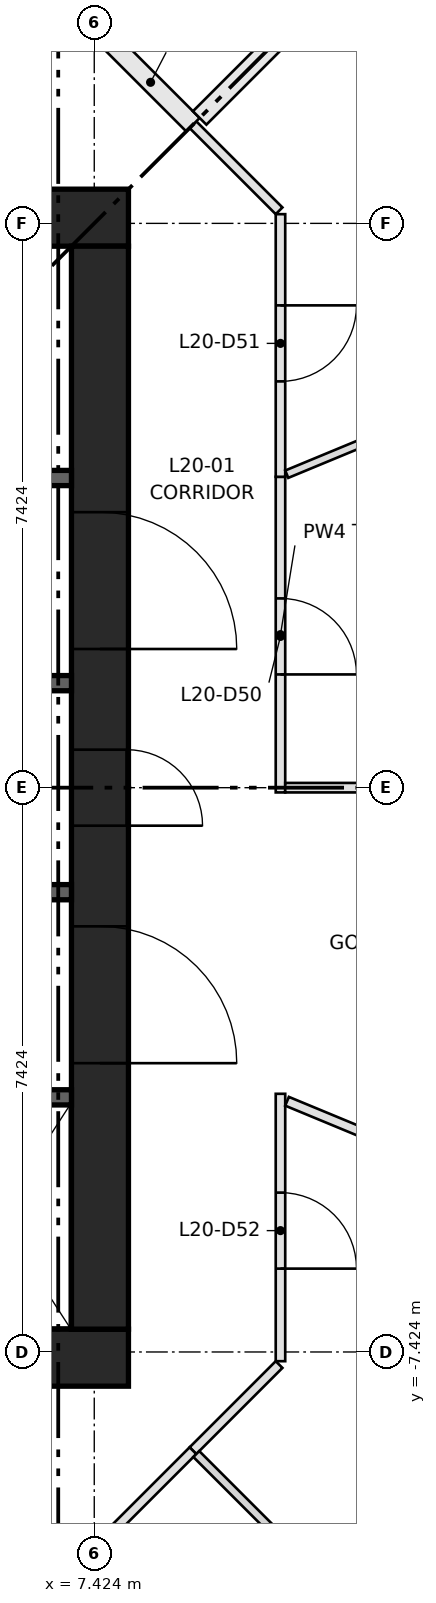
"""IFC4 building model, lengths in metres.
Left out: names, types, materials, properties, quantities, classifications, styles, units other than length and angle.
Written with IfcOpenShell. Run it as: python <this file> out.ifc"""

import sys

from ifc_helpers import new_model, si_unit, direction, frame, frame_2d, origin, place, context, subcontext, project, spatial, rectangle, extrude, element, fill, save


model = new_model("IFC4")
c1 = context("Model", 3, precision=1e-05, world=origin(), true_north=direction((0.0, 1.0)))
c2 = subcontext(c1, "Body", "Model", "MODEL_VIEW")
j1 = project(units=[si_unit("LENGTHUNIT", "METRE"), si_unit("PLANEANGLEUNIT", "RADIAN")], contexts=[c1])
p1 = place(None, origin())
s1 = spatial("IfcSite", under=j1, at=p1, CompositionType="ELEMENT")
p2 = place(p1, origin())
s2 = spatial("IfcBuilding", under=s1, at=p2, CompositionType="ELEMENT")
p3 = place(p2, frame((0.0, 0.0, 80.05)))
s3 = spatial("IfcBuildingStorey", under=s2, at=p3, CompositionType="ELEMENT", Elevation=80.05)
for number, where, z_axis, x_axis in (
    (1, (-7.874, -7.499, 0.0), (0.0, 0.0, 1.0), (1.0, 0.0, 0.0)),
    (2, (-7.874, 7.499, 0.0), (0.0, 0.0, 1.0), (1.0, 0.0, 0.0)),
):
    element("IfcWall", number, at=place(p3, frame(where, z_axis=z_axis, x_axis=x_axis)), inside=s3, PredefinedType="SHEAR", context=c2, shape_type="SweptSolid", body=[
        extrude(rectangle(XDim=15.748, YDim=0.75, at=frame_2d((7.874, 0.0))), origin(), (0.0, 0.0, 1.0), 3.65),
    ])
p4 = place(p3, frame((7.499, -7.124, 0.0), z_axis=(0.0, 0.0, 1.0), x_axis=(0.0, 1.0, 0.0)))
e3 = element("IfcWall", 3, at=p4, inside=s3, PredefinedType="SHEAR", context=c2, shape_type="SweptSolid", body=[
    extrude(rectangle(XDim=14.248, YDim=0.75, at=frame_2d((7.124, 0.0))), origin(), (0.0, 0.0, 1.0), 3.65),
])
p5 = place(p4, frame((6.624, 0.0, 0.0)))
e4 = element("IfcOpeningElement", 4, at=p5, cuts=e3, PredefinedType="OPENING", context=c2, shape_type="SweptSolid", body=[
    extrude(rectangle(XDim=1.0, YDim=2.1, at=frame_2d((0.5, 1.05))), frame((0.0, 0.385, 0.0), z_axis=(0.0, -1.0, 0.0), x_axis=(1.0, 0.0, 0.0)), (0.0, 0.0, 1.0), 0.77),
])
p6 = place(p4, frame((3.5, 0.0, 0.0)))
e5 = element("IfcOpeningElement", 5, at=p6, cuts=e3, PredefinedType="OPENING", context=c2, shape_type="SweptSolid", body=[
    extrude(rectangle(XDim=1.8, YDim=2.1, at=frame_2d((0.9, 1.05))), frame((0.0, 0.385, 0.0), z_axis=(0.0, -1.0, 0.0), x_axis=(1.0, 0.0, 0.0)), (0.0, 0.0, 1.0), 0.77),
])
p7 = place(p4, frame((8.948, 0.0, 0.0)))
e6 = element("IfcOpeningElement", 6, at=p7, cuts=e3, PredefinedType="OPENING", context=c2, shape_type="SweptSolid", body=[
    extrude(rectangle(XDim=1.8, YDim=2.1, at=frame_2d((0.9, 1.05))), frame((0.0, 0.385, 0.0), z_axis=(0.0, -1.0, 0.0), x_axis=(1.0, 0.0, 0.0)), (0.0, 0.0, 1.0), 0.77),
])
p8 = place(p3, frame((-7.124, -4.074, 0.0), z_axis=(0.0, 0.0, 1.0), x_axis=(1.0, 0.0, 0.0)))
e7 = element("IfcWall", 7, at=p8, inside=s3, PredefinedType="SHEAR", context=c2, shape_type="SweptSolid", body=[
    extrude(rectangle(XDim=14.248, YDim=0.2, at=frame_2d((7.124, 0.0))), origin(), (0.0, 0.0, 1.0), 3.3),
])
p9 = place(p8, frame((1.069, 0.0, 0.0)))
e8 = element("IfcOpeningElement", 8, at=p9, cuts=e7, PredefinedType="OPENING", context=c2, shape_type="SweptSolid", body=[
    extrude(rectangle(XDim=1.1, YDim=2.1, at=frame_2d((0.55, 1.05))), frame((0.0, 0.11, 0.0), z_axis=(0.0, -1.0, 0.0), x_axis=(1.0, 0.0, 0.0)), (0.0, 0.0, 1.0), 0.22),
])
p10 = place(p8, frame((4.206, 0.0, 0.0)))
e9 = element("IfcOpeningElement", 9, at=p10, cuts=e7, PredefinedType="OPENING", context=c2, shape_type="SweptSolid", body=[
    extrude(rectangle(XDim=1.1, YDim=2.1, at=frame_2d((0.55, 1.05))), frame((0.0, 0.11, 0.0), z_axis=(0.0, -1.0, 0.0), x_axis=(1.0, 0.0, 0.0)), (0.0, 0.0, 1.0), 0.22),
])
p11 = place(p8, frame((6.808, 0.0, 0.0)))
e10 = element("IfcOpeningElement", 10, at=p11, cuts=e7, PredefinedType="OPENING", context=c2, shape_type="SweptSolid", body=[
    extrude(rectangle(XDim=1.0, YDim=2.1, at=frame_2d((0.5, 1.05))), frame((0.0, 0.11, 0.0), z_axis=(0.0, -1.0, 0.0), x_axis=(1.0, 0.0, 0.0)), (0.0, 0.0, 1.0), 0.22),
])
p12 = place(p8, frame((8.777, 0.0, 0.0)))
e11 = element("IfcOpeningElement", 11, at=p12, cuts=e7, PredefinedType="OPENING", context=c2, shape_type="SweptSolid", body=[
    extrude(rectangle(XDim=1.0, YDim=2.1, at=frame_2d((0.5, 1.05))), frame((0.0, 0.11, 0.0), z_axis=(0.0, -1.0, 0.0), x_axis=(1.0, 0.0, 0.0)), (0.0, 0.0, 1.0), 0.22),
])
p13 = place(p8, frame((10.745, 0.0, 0.0)))
e12 = element("IfcOpeningElement", 12, at=p13, cuts=e7, PredefinedType="OPENING", context=c2, shape_type="SweptSolid", body=[
    extrude(rectangle(XDim=1.0, YDim=2.1, at=frame_2d((0.5, 1.05))), frame((0.0, 0.11, 0.0), z_axis=(0.0, -1.0, 0.0), x_axis=(1.0, 0.0, 0.0)), (0.0, 0.0, 1.0), 0.22),
])
p14 = place(p8, frame((12.714, 0.0, 0.0)))
e13 = element("IfcOpeningElement", 13, at=p14, cuts=e7, PredefinedType="OPENING", context=c2, shape_type="SweptSolid", body=[
    extrude(rectangle(XDim=1.0, YDim=2.1, at=frame_2d((0.5, 1.05))), frame((0.0, 0.11, 0.0), z_axis=(0.0, -1.0, 0.0), x_axis=(1.0, 0.0, 0.0)), (0.0, 0.0, 1.0), 0.22),
])
p15 = place(p3, frame((0.0, 4.074, 0.0), z_axis=(0.0, 0.0, 1.0), x_axis=(1.0, 0.0, 0.0)))
e14 = element("IfcWall", 14, at=p15, inside=s3, PredefinedType="SHEAR", context=c2, shape_type="SweptSolid", body=[
    extrude(rectangle(XDim=7.124, YDim=0.2, at=frame_2d((3.562, 0.0))), origin(), (0.0, 0.0, 1.0), 3.3),
])
p16 = place(p15, frame((0.753, 0.0, 0.0)))
e15 = element("IfcOpeningElement", 15, at=p16, cuts=e14, PredefinedType="OPENING", context=c2, shape_type="SweptSolid", body=[
    extrude(rectangle(XDim=1.0, YDim=2.1, at=frame_2d((0.5, 1.05))), frame((0.0, 0.11, 0.0), z_axis=(0.0, -1.0, 0.0), x_axis=(1.0, 0.0, 0.0)), (0.0, 0.0, 1.0), 0.22),
])
p17 = place(p15, frame((2.685, 0.0, 0.0)))
e16 = element("IfcOpeningElement", 16, at=p17, cuts=e14, PredefinedType="OPENING", context=c2, shape_type="SweptSolid", body=[
    extrude(rectangle(XDim=0.95, YDim=2.1, at=frame_2d((0.475, 1.05))), frame((0.0, 0.11, 0.0), z_axis=(0.0, -1.0, 0.0), x_axis=(1.0, 0.0, 0.0)), (0.0, 0.0, 1.0), 0.22),
])
p18 = place(p15, frame((4.06, 0.0, 0.0)))
e17 = element("IfcOpeningElement", 17, at=p18, cuts=e14, PredefinedType="OPENING", context=c2, shape_type="SweptSolid", body=[
    extrude(rectangle(XDim=1.0, YDim=2.1, at=frame_2d((0.5, 1.05))), frame((0.0, 0.11, 0.0), z_axis=(0.0, -1.0, 0.0), x_axis=(1.0, 0.0, 0.0)), (0.0, 0.0, 1.0), 0.22),
])
p19 = place(p15, frame((5.79, 0.0, 0.0)))
e18 = element("IfcOpeningElement", 18, at=p19, cuts=e14, PredefinedType="OPENING", context=c2, shape_type="SweptSolid", body=[
    extrude(rectangle(XDim=0.8, YDim=2.1, at=frame_2d((0.4, 1.05))), frame((0.0, 0.11, 0.0), z_axis=(0.0, -1.0, 0.0), x_axis=(1.0, 0.0, 0.0)), (0.0, 0.0, 1.0), 0.22),
])
for number, where, z_axis, x_axis in (
    (19, (4.374, -1.375, 0.0), (0.0, 0.0, 1.0), (1.0, 0.0, 0.0)),
    (20, (4.374, 1.375, 0.0), (0.0, 0.0, 1.0), (1.0, 0.0, 0.0)),
):
    element("IfcWall", number, at=place(p3, frame(where, z_axis=z_axis, x_axis=x_axis)), inside=s3, PredefinedType="SHEAR", context=c2, shape_type="SweptSolid", body=[
        extrude(rectangle(XDim=2.75, YDim=0.2, at=frame_2d((1.375, 0.0))), origin(), (0.0, 0.0, 1.0), 3.3),
    ])
p20 = place(p3, frame((9.874, 4.09, 0.0), z_axis=(0.0, 0.0, 1.0), x_axis=(0.0, -1.0, 0.0)))
e21 = element("IfcWall", 21, at=p20, inside=s3, PredefinedType="PARTITIONING", context=c2, shape_type="SweptSolid", body=[
    extrude(rectangle(XDim=4.152, YDim=0.125, at=frame_2d((2.076, 0.0))), origin(), (0.0, 0.0, 1.0), 3.3),
])
p21 = place(p20, frame((1.6, 0.0, 0.0)))
e22 = element("IfcOpeningElement", 22, at=p21, cuts=e21, PredefinedType="OPENING", context=c2, shape_type="SweptSolid", body=[
    extrude(rectangle(XDim=1.0, YDim=2.1, at=frame_2d((0.5, 1.05))), frame((0.0, 0.073, 0.0), z_axis=(0.0, -1.0, 0.0), x_axis=(1.0, 0.0, 0.0)), (0.0, 0.0, 1.0), 0.145),
])
p22 = place(p3, frame((8.722, 8.722, 0.0), z_axis=(0.0, 0.0, 1.0), x_axis=(0.70718294931, -0.707030604857, 0.0)))
e23 = element("IfcWall", 23, at=p22, inside=s3, PredefinedType="PARTITIONING", context=c2, shape_type="SweptSolid", body=[
    extrude(rectangle(XDim=1.603, YDim=0.125, at=frame_2d((0.801, 0.0))), origin(), (0.0, 0.0, 1.0), 3.3),
])
p23 = place(p3, frame((9.874, 7.545, 0.0), z_axis=(0.0, 0.0, 1.0), x_axis=(0.0, -1.0, 0.0)))
e24 = element("IfcWall", 24, at=p23, inside=s3, PredefinedType="PARTITIONING", context=c2, shape_type="SweptSolid", body=[
    extrude(rectangle(XDim=3.455, YDim=0.125, at=frame_2d((1.728, 0.0))), origin(), (0.0, 0.0, 1.0), 3.3),
])
p24 = place(p23, frame((1.2, 0.0, 0.0)))
e25 = element("IfcOpeningElement", 25, at=p24, cuts=e24, PredefinedType="OPENING", context=c2, shape_type="SweptSolid", body=[
    extrude(rectangle(XDim=1.0, YDim=2.1, at=frame_2d((0.5, 1.05))), frame((0.0, 0.073, 0.0), z_axis=(0.0, -1.0, 0.0), x_axis=(1.0, 0.0, 0.0)), (0.0, 0.0, 1.0), 0.145),
])
p25 = place(p3, frame((9.856, -7.589, 0.0), z_axis=(0.0, 0.0, 1.0), x_axis=(-0.70718294931, -0.707030604857, 0.0)))
e26 = element("IfcWall", 26, at=p25, inside=s3, PredefinedType="PARTITIONING", context=c2, shape_type="SweptSolid", body=[
    extrude(rectangle(XDim=1.603, YDim=0.125, at=frame_2d((0.801, 0.0))), origin(), (0.0, 0.0, 1.0), 3.3),
])
p26 = place(p3, frame((9.874, -4.027, 0.0), z_axis=(0.0, 0.0, 1.0), x_axis=(0.0, -1.0, 0.0)))
e27 = element("IfcWall", 27, at=p26, inside=s3, PredefinedType="PARTITIONING", context=c2, shape_type="SweptSolid", body=[
    extrude(rectangle(XDim=3.518, YDim=0.125, at=frame_2d((1.759, 0.0))), origin(), (0.0, 0.0, 1.0), 3.3),
])
p27 = place(p26, frame((1.3, 0.0, 0.0)))
e28 = element("IfcOpeningElement", 28, at=p27, cuts=e27, PredefinedType="OPENING", context=c2, shape_type="SweptSolid", body=[
    extrude(rectangle(XDim=1.0, YDim=2.1, at=frame_2d((0.5, 1.05))), frame((0.0, 0.073, 0.0), z_axis=(0.0, -1.0, 0.0), x_axis=(1.0, 0.0, 0.0)), (0.0, 0.0, 1.0), 0.145),
])
p28 = place(p3, frame((7.608, 9.837, 0.0), z_axis=(0.0, 0.0, 1.0), x_axis=(0.707029353672, -0.707184200224, 0.0)))
e29 = element("IfcWall", 29, at=p28, inside=s3, PredefinedType="PARTITIONING", context=c2, shape_type="SweptSolid", body=[
    extrude(rectangle(XDim=1.577, YDim=0.25, at=frame_2d((0.788, 0.0))), origin(), (0.0, 0.0, 1.0), 3.3),
])
p29 = place(p3, frame((8.722, -8.722, 0.0), z_axis=(0.0, 0.0, 1.0), x_axis=(-0.707030604857, -0.70718294931, 0.0)))
e30 = element("IfcWall", 30, at=p29, inside=s3, PredefinedType="PARTITIONING", context=c2, shape_type="SweptSolid", body=[
    extrude(rectangle(XDim=1.603, YDim=0.125, at=frame_2d((0.801, 0.0))), origin(), (0.0, 0.0, 1.0), 3.3),
])
p30 = place(p3, frame((9.957, 4.124, 0.0), z_axis=(0.0, 0.0, 1.0), x_axis=(0.923858155589, 0.382735036745, 0.0)))
e31 = element("IfcWall", 31, at=p30, inside=s3, PredefinedType="PARTITIONING", context=c2, shape_type="SweptSolid", body=[
    extrude(rectangle(XDim=2.813, YDim=0.105, at=frame_2d((1.406, 0.0))), origin(), (0.0, 0.0, 1.0), 3.3),
])
p31 = place(p3, frame((13.59, 0.0, 0.0), z_axis=(0.0, 0.0, 1.0), x_axis=(-1.0, 0.0, 0.0)))
e32 = element("IfcWall", 32, at=p31, inside=s3, PredefinedType="PARTITIONING", context=c2, shape_type="SweptSolid", body=[
    extrude(rectangle(XDim=3.654, YDim=0.125, at=frame_2d((1.827, 0.0))), origin(), (0.0, 0.0, 1.0), 3.3),
])
p32 = place(p3, frame((12.912, 12.912, 0.0), z_axis=(0.0, 0.0, 1.0), x_axis=(-0.707106781187, -0.707106781187, 0.0)))
e33 = element("IfcWall", 33, at=p32, inside=s3, PredefinedType="PARTITIONING", context=c2, shape_type="SweptSolid", body=[
    extrude(rectangle(XDim=5.8, YDim=0.25, at=frame_2d((2.9, 0.0))), origin(), (0.0, 0.0, 1.0), 3.3),
])
p33 = place(p3, frame((8.767, -8.767, 0.0), z_axis=(0.0, 0.0, 1.0), x_axis=(0.707106781187, -0.707106781187, 0.0)))
e34 = element("IfcWall", 34, at=p33, inside=s3, PredefinedType="PARTITIONING", context=c2, shape_type="SweptSolid", body=[
    extrude(rectangle(XDim=5.862, YDim=0.11, at=frame_2d((2.931, 0.0))), origin(), (0.0, 0.0, 1.0), 3.3),
])
p34 = place(p3, frame((9.96, -4.126, 0.0), z_axis=(0.0, 0.0, 1.0), x_axis=(0.923869574034, -0.382707473372, 0.0)))
e35 = element("IfcWall", 35, at=p34, inside=s3, PredefinedType="PARTITIONING", context=c2, shape_type="SweptSolid", body=[
    extrude(rectangle(XDim=2.809, YDim=0.125, at=frame_2d((1.404, 0.0))), origin(), (0.0, 0.0, 1.0), 3.3),
])
p35 = place(p5, frame((1.0, 0.0, 0.0), z_axis=(0.0, 0.0, 1.0), x_axis=(-1.0, 0.0, 0.0)))
e36 = element("IfcDoor", 36, at=p35, inside=s3, OperationType="SINGLE_SWING_LEFT", PredefinedType="DOOR", context=c2, shape_type="SweptSolid", body=[
    extrude(rectangle(XDim=1.0, YDim=2.1, at=frame_2d((0.5, 1.05))), frame((0.0, 0.375, 0.0), z_axis=(0.0, -1.0, 0.0), x_axis=(1.0, 0.0, 0.0)), (0.0, 0.0, 1.0), 0.05),
])
fill(e4, e36)
p36 = place(p6, frame((1.8, 0.0, 0.0), z_axis=(0.0, 0.0, 1.0), x_axis=(-1.0, 0.0, 0.0)))
e37 = element("IfcDoor", 37, at=p36, inside=s3, OperationType="DOUBLE_DOOR_SINGLE_SWING", PredefinedType="DOOR", context=c2, shape_type="SweptSolid", body=[
    extrude(rectangle(XDim=1.8, YDim=2.1, at=frame_2d((0.9, 1.05))), frame((0.0, 0.025, 0.0), z_axis=(0.0, -1.0, 0.0), x_axis=(1.0, 0.0, 0.0)), (0.0, 0.0, 1.0), 0.05),
])
fill(e5, e37)
p37 = place(p7, frame((1.8, 0.0, 0.0), z_axis=(0.0, 0.0, 1.0), x_axis=(-1.0, 0.0, 0.0)))
e38 = element("IfcDoor", 38, at=p37, inside=s3, OperationType="DOUBLE_DOOR_SINGLE_SWING", PredefinedType="DOOR", context=c2, shape_type="SweptSolid", body=[
    extrude(rectangle(XDim=1.8, YDim=2.1, at=frame_2d((0.9, 1.05))), frame((0.0, 0.025, 0.0), z_axis=(0.0, -1.0, 0.0), x_axis=(1.0, 0.0, 0.0)), (0.0, 0.0, 1.0), 0.05),
])
fill(e6, e38)
p38 = place(p21, origin())
e39 = element("IfcDoor", 39, at=p38, inside=s3, OperationType="SINGLE_SWING_RIGHT", PredefinedType="DOOR", context=c2, shape_type="SweptSolid", body=[
    extrude(rectangle(XDim=1.0, YDim=2.1, at=frame_2d((0.5, 1.05))), frame((0.0, 0.025, 0.0), z_axis=(0.0, -1.0, 0.0), x_axis=(1.0, 0.0, 0.0)), (0.0, 0.0, 1.0), 0.05),
])
fill(e22, e39)
p39 = place(p24, origin())
e40 = element("IfcDoor", 40, at=p39, inside=s3, OperationType="SINGLE_SWING_LEFT", PredefinedType="DOOR", context=c2, shape_type="SweptSolid", body=[
    extrude(rectangle(XDim=1.0, YDim=2.1, at=frame_2d((0.5, 1.05))), frame((0.0, 0.025, 0.0), z_axis=(0.0, -1.0, 0.0), x_axis=(1.0, 0.0, 0.0)), (0.0, 0.0, 1.0), 0.05),
])
fill(e25, e40)
p40 = place(p27, origin())
e41 = element("IfcDoor", 41, at=p40, inside=s3, OperationType="SINGLE_SWING_RIGHT", PredefinedType="DOOR", context=c2, shape_type="SweptSolid", body=[
    extrude(rectangle(XDim=1.0, YDim=2.1, at=frame_2d((0.5, 1.05))), frame((0.0, 0.025, 0.0), z_axis=(0.0, -1.0, 0.0), x_axis=(1.0, 0.0, 0.0)), (0.0, 0.0, 1.0), 0.05),
])
fill(e28, e41)
save(model, sys.argv[1])
